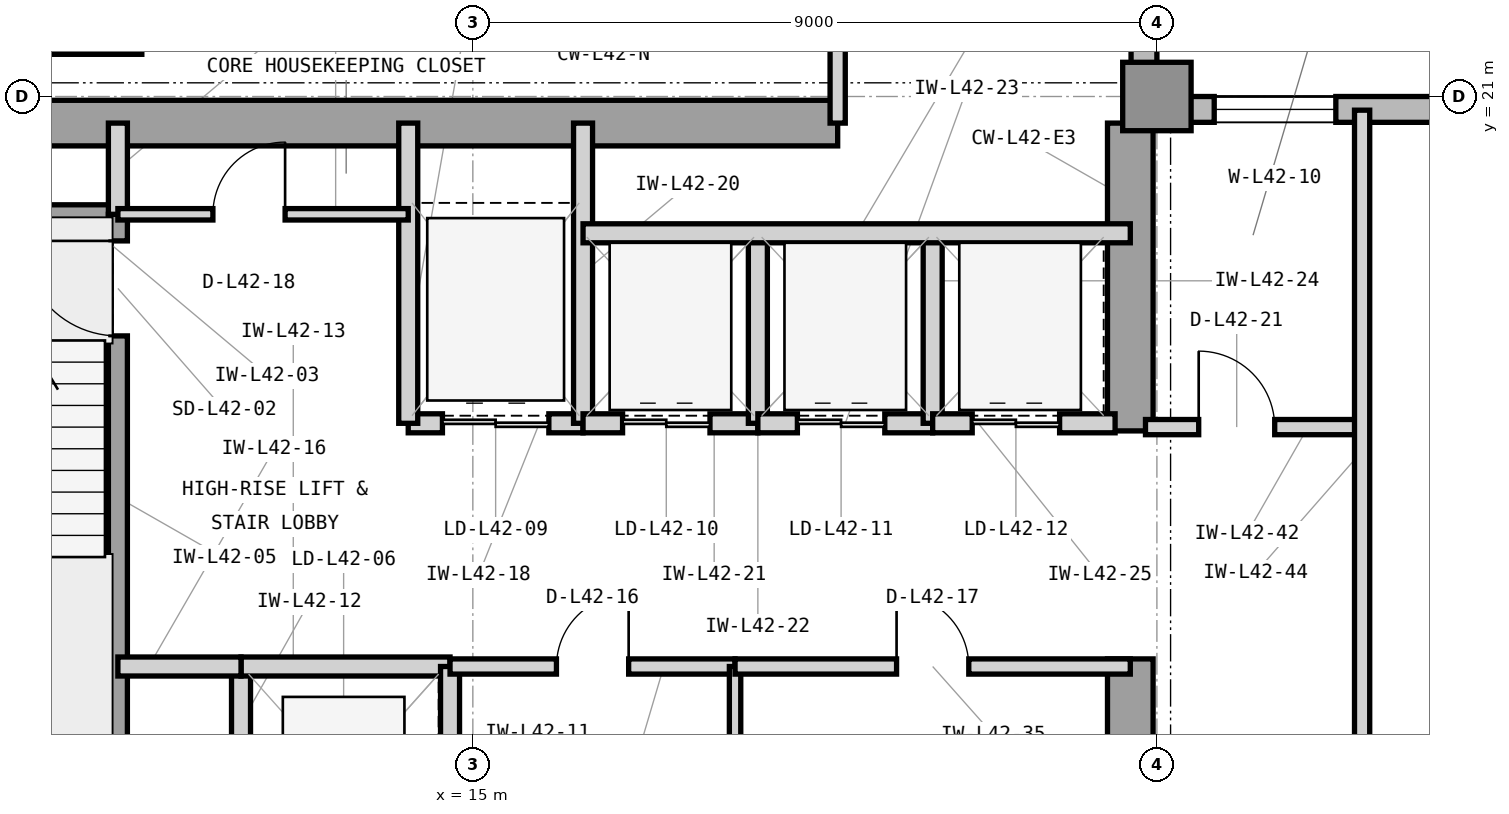
"""IFC4 building model, lengths in metres.
Left out: names, types, materials, properties, quantities, classifications, styles, units other than length and angle.
Written with IfcOpenShell. Run it as: python <this file> out.ifc"""

import sys

from ifc_helpers import new_model, si_unit, direction, frame, frame_2d, origin, origin_2d, place, context, subcontext, project, spatial, rectangle, extrude, element, fill, save


model = new_model("IFC4")
c1 = context("Model", 3, precision=1e-05, world=origin(), true_north=direction((0.0, 1.0)))
c2 = subcontext(c1, "Body", "Model", "MODEL_VIEW")
j1 = project(units=[si_unit("LENGTHUNIT", "METRE"), si_unit("PLANEANGLEUNIT", "RADIAN")], contexts=[c1])
p1 = place(None, origin())
s1 = spatial("IfcSite", under=j1, at=p1, CompositionType="ELEMENT")
p2 = place(p1, origin())
s2 = spatial("IfcBuilding", under=s1, at=p2, CompositionType="ELEMENT")
p3 = place(p2, frame((0.0, 0.0, 176.1)))
s3 = spatial("IfcBuildingStorey", under=s2, at=p3, CompositionType="ELEMENT", Elevation=176.1)
p4 = place(p3, frame((7.475, 20.65, 0.0), z_axis=(0.0, 0.0, 1.0), x_axis=(1.0, 0.0, 0.0)))
e1 = element("IfcWall", 1, at=p4, inside=s3, PredefinedType="SHEAR", context=c2, shape_type="SweptSolid", body=[
    extrude(rectangle(XDim=12.325, YDim=0.6, at=frame_2d((6.163, 0.0))), origin(), (0.0, 0.0, 1.0), 3.9),
])
p5 = place(p3, frame((23.65, 10.4, 0.0), z_axis=(0.0, 0.0, 1.0), x_axis=(0.0, 1.0, 0.0)))
e2 = element("IfcWall", 2, at=p5, inside=s3, PredefinedType="SHEAR", context=c2, shape_type="SweptSolid", body=[
    extrude(rectangle(XDim=3.2, YDim=0.6, at=frame_2d((1.6, 0.0))), origin(), (0.0, 0.0, 1.0), 3.9),
])
p6 = place(p3, frame((23.65, 16.6, 0.0), z_axis=(0.0, 0.0, 1.0), x_axis=(0.0, 1.0, 0.0)))
e3 = element("IfcWall", 3, at=p6, inside=s3, PredefinedType="SHEAR", context=c2, shape_type="SweptSolid", body=[
    extrude(rectangle(XDim=4.05, YDim=0.6, at=frame_2d((2.025, 0.0))), origin(), (0.0, 0.0, 1.0), 3.9),
])
p7 = place(p3, frame((24.0, 21.0, 0.0), z_axis=(0.0, 0.0, 1.0), x_axis=(1.0, 0.0, 0.0)))
e4 = element("IfcColumn", 4, at=p7, inside=s3, PredefinedType="COLUMN", context=c2, shape_type="SweptSolid", body=[
    extrude(rectangle(XDim=0.9, YDim=0.9, at=origin_2d()), origin(), (0.0, 0.0, 1.0), 3.9),
])
p8 = place(p3, frame((55.4, 20.83, 0.0), z_axis=(0.0, 0.0, 1.0), x_axis=(-1.0, 0.0, 0.0)))
e5 = element("IfcWall", 5, at=p8, inside=s3, PredefinedType="STANDARD", context=c2, shape_type="SweptSolid", body=[
    extrude(rectangle(XDim=31.4, YDim=0.34, at=frame_2d((15.7, 0.0))), origin(), (0.0, 0.0, 1.0), 3.7),
])
p9 = place(p8, frame((17.167, 0.0, 0.9)))
e6 = element("IfcOpeningElement", 6, at=p9, cuts=e5, PredefinedType="OPENING", context=c2, shape_type="SweptSolid", body=[
    extrude(rectangle(XDim=2.3, YDim=2.2, at=frame_2d((1.15, 1.1))), frame((0.0, 0.18, 0.0), z_axis=(0.0, -1.0, 0.0), x_axis=(1.0, 0.0, 0.0)), (0.0, 0.0, 1.0), 0.36),
])
p10 = place(p8, frame((29.046, 0.0, 0.9)))
e7 = element("IfcOpeningElement", 7, at=p10, cuts=e5, PredefinedType="OPENING", context=c2, shape_type="SweptSolid", body=[
    extrude(rectangle(XDim=1.6, YDim=2.2, at=frame_2d((0.8, 1.1))), frame((0.0, 0.18, 0.0), z_axis=(0.0, -1.0, 0.0), x_axis=(1.0, 0.0, 0.0)), (0.0, 0.0, 1.0), 0.36),
])
p11 = place(p8, frame((8.675, 0.0, 0.9)))
e8 = element("IfcOpeningElement", 8, at=p11, cuts=e5, PredefinedType="OPENING", context=c2, shape_type="SweptSolid", body=[
    extrude(rectangle(XDim=2.3, YDim=2.2, at=frame_2d((1.15, 1.1))), frame((0.0, 0.18, 0.0), z_axis=(0.0, -1.0, 0.0), x_axis=(1.0, 0.0, 0.0)), (0.0, 0.0, 1.0), 0.36),
])
p12 = place(p3, frame((23.83, 21.0, 0.0), z_axis=(0.0, 0.0, 1.0), x_axis=(0.0, 1.0, 0.0)))
e9 = element("IfcWall", 9, at=p12, inside=s3, PredefinedType="STANDARD", context=c2, shape_type="SweptSolid", body=[
    extrude(rectangle(XDim=22.4, YDim=0.34, at=frame_2d((11.2, 0.0))), origin(), (0.0, 0.0, 1.0), 3.7),
])
p13 = place(p3, frame((7.7, 19.45, 0.0), z_axis=(0.0, 0.0, 1.0), x_axis=(1.0, 0.0, 0.0)))
e10 = element("IfcWall", 10, at=p13, inside=s3, PredefinedType="SHEAR", context=c2, shape_type="SweptSolid", body=[
    extrude(rectangle(XDim=2.755, YDim=0.25, at=frame_2d((1.377, 0.0))), origin(), (0.0, 0.0, 1.0), 3.9),
])
p14 = place(p3, frame((10.33, 12.0, 0.0), z_axis=(0.0, 0.0, 1.0), x_axis=(0.0, 1.0, 0.0)))
e11 = element("IfcWall", 11, at=p14, inside=s3, PredefinedType="SHEAR", context=c2, shape_type="SweptSolid", body=[
    extrude(rectangle(XDim=7.45, YDim=0.25, at=frame_2d((3.725, 0.0))), origin(), (0.0, 0.0, 1.0), 3.9),
])
p15 = place(p14, frame((5.85, 0.0, 0.0)))
e12 = element("IfcOpeningElement", 12, at=p15, cuts=e11, PredefinedType="OPENING", context=c2, shape_type="SweptSolid", body=[
    extrude(rectangle(XDim=1.25, YDim=2.2, at=frame_2d((0.625, 1.1))), frame((0.0, 0.135, 0.0), z_axis=(0.0, -1.0, 0.0), x_axis=(1.0, 0.0, 0.0)), (0.0, 0.0, 1.0), 0.27),
])
p16 = place(p3, frame((10.33, 19.45, 0.0), z_axis=(0.0, 0.0, 1.0), x_axis=(0.0, 1.0, 0.0)))
e13 = element("IfcWall", 13, at=p16, inside=s3, PredefinedType="PARTITIONING", context=c2, shape_type="SweptSolid", body=[
    extrude(rectangle(XDim=1.2, YDim=0.25, at=frame_2d((0.6, 0.0))), origin(), (0.0, 0.0, 1.0), 3.073),
])
p17 = place(p3, frame((11.95, 10.5, 0.0), z_axis=(0.0, 0.0, 1.0), x_axis=(0.0, 1.0, 0.0)))
e14 = element("IfcWall", 14, at=p17, inside=s3, PredefinedType="PARTITIONING", context=c2, shape_type="SweptSolid", body=[
    extrude(rectangle(XDim=3.0, YDim=0.25, at=frame_2d((1.5, 0.0))), origin(), (0.0, 0.0, 1.0), 3.69),
])
p18 = place(p3, frame((11.95, 13.5, 0.0), z_axis=(0.0, 0.0, 1.0), x_axis=(1.0, 0.0, 0.0)))
e15 = element("IfcWall", 15, at=p18, inside=s3, PredefinedType="PARTITIONING", context=c2, shape_type="SweptSolid", body=[
    extrude(rectangle(XDim=2.75, YDim=0.25, at=frame_2d((1.375, 0.0))), origin(), (0.0, 0.0, 1.0), 3.283),
])
p19 = place(p3, frame((14.7, 10.5, 0.0), z_axis=(0.0, 0.0, 1.0), x_axis=(0.0, 1.0, 0.0)))
e16 = element("IfcWall", 16, at=p19, inside=s3, PredefinedType="PARTITIONING", context=c2, shape_type="SweptSolid", body=[
    extrude(rectangle(XDim=3.0, YDim=0.25, at=frame_2d((1.5, 0.0))), origin(), (0.0, 0.0, 1.0), 3.69),
])
p20 = place(p3, frame((10.33, 13.5, 0.0), z_axis=(0.0, 0.0, 1.0), x_axis=(1.0, 0.0, 0.0)))
e17 = element("IfcWall", 17, at=p20, inside=s3, PredefinedType="PARTITIONING", context=c2, shape_type="SweptSolid", body=[
    extrude(rectangle(XDim=1.62, YDim=0.25, at=frame_2d((0.81, 0.0))), origin(), (0.0, 0.0, 1.0), 3.283),
])
p21 = place(p3, frame((14.15, 16.7, 0.0), z_axis=(0.0, 0.0, 1.0), x_axis=(1.0, 0.0, 0.0)))
e18 = element("IfcWall", 18, at=p21, inside=s3, PredefinedType="PARTITIONING", context=c2, shape_type="SweptSolid", body=[
    extrude(rectangle(XDim=2.3, YDim=0.25, at=frame_2d((1.15, 0.0))), origin(), (0.0, 0.0, 1.0), 3.283),
])
p22 = place(p21, frame((0.45, 0.0, 0.0)))
e19 = element("IfcOpeningElement", 19, at=p22, cuts=e18, PredefinedType="OPENING", context=c2, shape_type="SweptSolid", body=[
    extrude(rectangle(XDim=1.4, YDim=2.35, at=frame_2d((0.7, 1.175))), frame((0.0, 0.135, 0.0), z_axis=(0.0, -1.0, 0.0), x_axis=(1.0, 0.0, 0.0)), (0.0, 0.0, 1.0), 0.27),
])
for number, where, z_axis, x_axis in (
    (20, (14.15, 16.7, 0.0), (0.0, 0.0, 1.0), (0.0, 1.0, 0.0)),
    (21, (16.45, 16.7, 0.0), (0.0, 0.0, 1.0), (0.0, 1.0, 0.0)),
):
    element("IfcWall", number, at=place(p3, frame(where, z_axis=z_axis, x_axis=x_axis)), inside=s3, PredefinedType="PARTITIONING", context=c2, shape_type="SweptSolid", body=[
        extrude(rectangle(XDim=3.95, YDim=0.25, at=frame_2d((1.975, 0.0))), origin(), (0.0, 0.0, 1.0), 3.69),
    ])
p23 = place(p3, frame((16.45, 16.7, 0.0), z_axis=(0.0, 0.0, 1.0), x_axis=(1.0, 0.0, 0.0)))
e22 = element("IfcWall", 22, at=p23, inside=s3, PredefinedType="PARTITIONING", context=c2, shape_type="SweptSolid", body=[
    extrude(rectangle(XDim=2.3, YDim=0.25, at=frame_2d((1.15, 0.0))), origin(), (0.0, 0.0, 1.0), 3.283),
])
p24 = place(p23, frame((0.52, 0.0, 0.0)))
e23 = element("IfcOpeningElement", 23, at=p24, cuts=e22, PredefinedType="OPENING", context=c2, shape_type="SweptSolid", body=[
    extrude(rectangle(XDim=1.15, YDim=2.25, at=frame_2d((0.575, 1.125))), frame((0.0, 0.135, 0.0), z_axis=(0.0, -1.0, 0.0), x_axis=(1.0, 0.0, 0.0)), (0.0, 0.0, 1.0), 0.27),
])
p25 = place(p3, frame((18.75, 16.7, 0.0), z_axis=(0.0, 0.0, 1.0), x_axis=(0.0, 1.0, 0.0)))
e24 = element("IfcWall", 24, at=p25, inside=s3, PredefinedType="PARTITIONING", context=c2, shape_type="SweptSolid", body=[
    extrude(rectangle(XDim=2.5, YDim=0.25, at=frame_2d((1.25, 0.0))), origin(), (0.0, 0.0, 1.0), 3.69),
])
p26 = place(p3, frame((18.75, 16.7, 0.0), z_axis=(0.0, 0.0, 1.0), x_axis=(1.0, 0.0, 0.0)))
e25 = element("IfcWall", 25, at=p26, inside=s3, PredefinedType="PARTITIONING", context=c2, shape_type="SweptSolid", body=[
    extrude(rectangle(XDim=2.3, YDim=0.25, at=frame_2d((1.15, 0.0))), origin(), (0.0, 0.0, 1.0), 3.283),
])
p27 = place(p26, frame((0.52, 0.0, 0.0)))
e26 = element("IfcOpeningElement", 26, at=p27, cuts=e25, PredefinedType="OPENING", context=c2, shape_type="SweptSolid", body=[
    extrude(rectangle(XDim=1.15, YDim=2.25, at=frame_2d((0.575, 1.125))), frame((0.0, 0.135, 0.0), z_axis=(0.0, -1.0, 0.0), x_axis=(1.0, 0.0, 0.0)), (0.0, 0.0, 1.0), 0.27),
])
p28 = place(p3, frame((21.05, 16.7, 0.0), z_axis=(0.0, 0.0, 1.0), x_axis=(0.0, 1.0, 0.0)))
e27 = element("IfcWall", 27, at=p28, inside=s3, PredefinedType="PARTITIONING", context=c2, shape_type="SweptSolid", body=[
    extrude(rectangle(XDim=2.5, YDim=0.25, at=frame_2d((1.25, 0.0))), origin(), (0.0, 0.0, 1.0), 3.69),
])
p29 = place(p3, frame((21.05, 16.7, 0.0), z_axis=(0.0, 0.0, 1.0), x_axis=(1.0, 0.0, 0.0)))
e28 = element("IfcWall", 28, at=p29, inside=s3, PredefinedType="PARTITIONING", context=c2, shape_type="SweptSolid", body=[
    extrude(rectangle(XDim=2.4, YDim=0.25, at=frame_2d((1.2, 0.0))), origin(), (0.0, 0.0, 1.0), 3.283),
])
p30 = place(p29, frame((0.52, 0.0, 0.0)))
e29 = element("IfcOpeningElement", 29, at=p30, cuts=e28, PredefinedType="OPENING", context=c2, shape_type="SweptSolid", body=[
    extrude(rectangle(XDim=1.15, YDim=2.25, at=frame_2d((0.575, 1.125))), frame((0.0, 0.135, 0.0), z_axis=(0.0, -1.0, 0.0), x_axis=(1.0, 0.0, 0.0)), (0.0, 0.0, 1.0), 0.27),
])
p31 = place(p3, frame((16.45, 19.2, 0.0), z_axis=(0.0, 0.0, 1.0), x_axis=(1.0, 0.0, 0.0)))
e30 = element("IfcWall", 30, at=p31, inside=s3, PredefinedType="PARTITIONING", context=c2, shape_type="SweptSolid", body=[
    extrude(rectangle(XDim=7.2, YDim=0.25, at=frame_2d((3.6, 0.0))), origin(), (0.0, 0.0, 1.0), 3.69),
])
p32 = place(p3, frame((14.7, 13.5, 0.0), z_axis=(0.0, 0.0, 1.0), x_axis=(1.0, 0.0, 0.0)))
e31 = element("IfcWall", 31, at=p32, inside=s3, PredefinedType="PARTITIONING", context=c2, shape_type="SweptSolid", body=[
    extrude(rectangle(XDim=3.75, YDim=0.2, at=frame_2d((1.875, 0.0))), origin(), (0.0, 0.0, 1.0), 3.283),
])
p33 = place(p32, frame((1.4, 0.0, 0.0)))
e32 = element("IfcOpeningElement", 32, at=p33, cuts=e31, PredefinedType="OPENING", context=c2, shape_type="SweptSolid", body=[
    extrude(rectangle(XDim=0.95, YDim=2.1, at=frame_2d((0.475, 1.05))), frame((0.0, 0.11, 0.0), z_axis=(0.0, -1.0, 0.0), x_axis=(1.0, 0.0, 0.0)), (0.0, 0.0, 1.0), 0.22),
])
p34 = place(p3, frame((18.45, 10.28, 0.0), z_axis=(0.0, 0.0, 1.0), x_axis=(0.0, 1.0, 0.0)))
e33 = element("IfcWall", 33, at=p34, inside=s3, PredefinedType="PARTITIONING", context=c2, shape_type="SweptSolid", body=[
    extrude(rectangle(XDim=3.22, YDim=0.15, at=frame_2d((1.61, 0.0))), origin(), (0.0, 0.0, 1.0), 3.69),
])
p35 = place(p3, frame((18.45, 13.5, 0.0), z_axis=(0.0, 0.0, 1.0), x_axis=(1.0, 0.0, 0.0)))
e34 = element("IfcWall", 34, at=p35, inside=s3, PredefinedType="PARTITIONING", context=c2, shape_type="SweptSolid", body=[
    extrude(rectangle(XDim=5.2, YDim=0.2, at=frame_2d((2.6, 0.0))), origin(), (0.0, 0.0, 1.0), 3.283),
])
p36 = place(p35, frame((2.125, 0.0, 0.0)))
e35 = element("IfcOpeningElement", 35, at=p36, cuts=e34, PredefinedType="OPENING", context=c2, shape_type="SweptSolid", body=[
    extrude(rectangle(XDim=0.95, YDim=2.1, at=frame_2d((0.475, 1.05))), frame((0.0, 0.11, 0.0), z_axis=(0.0, -1.0, 0.0), x_axis=(1.0, 0.0, 0.0)), (0.0, 0.0, 1.0), 0.22),
])
p37 = place(p3, frame((10.33, 19.45, 0.0), z_axis=(0.0, 0.0, 1.0), x_axis=(1.0, 0.0, 0.0)))
e36 = element("IfcWall", 36, at=p37, inside=s3, PredefinedType="PARTITIONING", context=c2, shape_type="SweptSolid", body=[
    extrude(rectangle(XDim=3.82, YDim=0.15, at=frame_2d((1.91, 0.0))), origin(), (0.0, 0.0, 1.0), 3.69),
])
p38 = place(p37, frame((1.25, 0.0, 0.0)))
e37 = element("IfcOpeningElement", 37, at=p38, cuts=e36, PredefinedType="OPENING", context=c2, shape_type="SweptSolid", body=[
    extrude(rectangle(XDim=0.95, YDim=2.1, at=frame_2d((0.475, 1.05))), frame((0.0, 0.085, 0.0), z_axis=(0.0, -1.0, 0.0), x_axis=(1.0, 0.0, 0.0)), (0.0, 0.0, 1.0), 0.17),
])
p39 = place(p3, frame((6.555, 21.68, 0.0), z_axis=(0.0, 0.0, 1.0), x_axis=(1.0, 0.0, 0.0)))
e38 = element("IfcWall", 38, at=p39, inside=s3, PredefinedType="SHEAR", context=c2, shape_type="SweptSolid", body=[
    extrude(rectangle(XDim=4.09, YDim=0.25, at=frame_2d((2.045, 0.0))), origin(), (0.0, 0.0, 1.0), 3.9),
])
p40 = place(p3, frame((23.85, 16.65, 0.0), z_axis=(0.0, 0.0, 1.0), x_axis=(1.0, 0.0, 0.0)))
e39 = element("IfcWall", 39, at=p40, inside=s3, PredefinedType="PARTITIONING", context=c2, shape_type="SweptSolid", body=[
    extrude(rectangle(XDim=2.85, YDim=0.2, at=frame_2d((1.425, 0.0))), origin(), (0.0, 0.0, 1.0), 3.69),
])
p41 = place(p40, frame((0.7, 0.0, 0.0)))
e40 = element("IfcOpeningElement", 40, at=p41, cuts=e39, PredefinedType="OPENING", context=c2, shape_type="SweptSolid", body=[
    extrude(rectangle(XDim=1.0, YDim=2.15, at=frame_2d((0.5, 1.075))), frame((0.0, 0.11, 0.0), z_axis=(0.0, -1.0, 0.0), x_axis=(1.0, 0.0, 0.0)), (0.0, 0.0, 1.0), 0.22),
])
p42 = place(p3, frame((26.7, 11.85, 0.0), z_axis=(0.0, 0.0, 1.0), x_axis=(0.0, 1.0, 0.0)))
e41 = element("IfcWall", 41, at=p42, inside=s3, PredefinedType="PARTITIONING", context=c2, shape_type="SweptSolid", body=[
    extrude(rectangle(XDim=8.97, YDim=0.2, at=frame_2d((4.485, 0.0))), origin(), (0.0, 0.0, 1.0), 3.69),
])
p43 = place(p3, frame((19.8, 20.65, 0.0), z_axis=(0.0, 0.0, 1.0), x_axis=(0.0, 1.0, 0.0)))
e42 = element("IfcWall", 42, at=p43, inside=s3, PredefinedType="PARTITIONING", context=c2, shape_type="SweptSolid", body=[
    extrude(rectangle(XDim=6.15, YDim=0.2, at=frame_2d((3.075, 0.0))), origin(), (0.0, 0.0, 1.0), 3.69),
])
p44 = place(p15, origin())
e43 = element("IfcDoor", 43, at=p44, inside=s3, OperationType="SINGLE_SWING_RIGHT", PredefinedType="DOOR", context=c2, shape_type="SweptSolid", body=[
    extrude(rectangle(XDim=1.25, YDim=2.2, at=frame_2d((0.625, 1.1))), frame((0.0, 0.025, 0.0), z_axis=(0.0, -1.0, 0.0), x_axis=(1.0, 0.0, 0.0)), (0.0, 0.0, 1.0), 0.05),
])
fill(e12, e43)
p45 = place(p22, origin())
e44 = element("IfcDoor", 44, at=p45, inside=s3, OperationType="DOUBLE_DOOR_SLIDING", PredefinedType="DOOR", context=c2, shape_type="SweptSolid", body=[
    extrude(rectangle(XDim=1.4, YDim=2.35, at=frame_2d((0.7, 1.175))), frame((0.0, 0.025, 0.0), z_axis=(0.0, -1.0, 0.0), x_axis=(1.0, 0.0, 0.0)), (0.0, 0.0, 1.0), 0.05),
])
fill(e19, e44)
p46 = place(p24, origin())
e45 = element("IfcDoor", 45, at=p46, inside=s3, OperationType="DOUBLE_DOOR_SLIDING", PredefinedType="DOOR", context=c2, shape_type="SweptSolid", body=[
    extrude(rectangle(XDim=1.15, YDim=2.25, at=frame_2d((0.575, 1.125))), frame((0.0, 0.025, 0.0), z_axis=(0.0, -1.0, 0.0), x_axis=(1.0, 0.0, 0.0)), (0.0, 0.0, 1.0), 0.05),
])
fill(e23, e45)
p47 = place(p27, origin())
e46 = element("IfcDoor", 46, at=p47, inside=s3, OperationType="DOUBLE_DOOR_SLIDING", PredefinedType="DOOR", context=c2, shape_type="SweptSolid", body=[
    extrude(rectangle(XDim=1.15, YDim=2.25, at=frame_2d((0.575, 1.125))), frame((0.0, 0.025, 0.0), z_axis=(0.0, -1.0, 0.0), x_axis=(1.0, 0.0, 0.0)), (0.0, 0.0, 1.0), 0.05),
])
fill(e26, e46)
p48 = place(p30, origin())
e47 = element("IfcDoor", 47, at=p48, inside=s3, OperationType="DOUBLE_DOOR_SLIDING", PredefinedType="DOOR", context=c2, shape_type="SweptSolid", body=[
    extrude(rectangle(XDim=1.15, YDim=2.25, at=frame_2d((0.575, 1.125))), frame((0.0, 0.025, 0.0), z_axis=(0.0, -1.0, 0.0), x_axis=(1.0, 0.0, 0.0)), (0.0, 0.0, 1.0), 0.05),
])
fill(e29, e47)
p49 = place(p33, origin())
e48 = element("IfcDoor", 48, at=p49, inside=s3, OperationType="SINGLE_SWING_RIGHT", PredefinedType="DOOR", context=c2, shape_type="SweptSolid", body=[
    extrude(rectangle(XDim=0.95, YDim=2.1, at=frame_2d((0.475, 1.05))), frame((0.0, 0.025, 0.0), z_axis=(0.0, -1.0, 0.0), x_axis=(1.0, 0.0, 0.0)), (0.0, 0.0, 1.0), 0.05),
])
fill(e32, e48)
p50 = place(p36, origin())
e49 = element("IfcDoor", 49, at=p50, inside=s3, OperationType="SINGLE_SWING_LEFT", PredefinedType="DOOR", context=c2, shape_type="SweptSolid", body=[
    extrude(rectangle(XDim=0.95, YDim=2.1, at=frame_2d((0.475, 1.05))), frame((0.0, 0.025, 0.0), z_axis=(0.0, -1.0, 0.0), x_axis=(1.0, 0.0, 0.0)), (0.0, 0.0, 1.0), 0.05),
])
fill(e35, e49)
p51 = place(p38, origin())
e50 = element("IfcDoor", 50, at=p51, inside=s3, OperationType="SINGLE_SWING_RIGHT", PredefinedType="DOOR", context=c2, shape_type="SweptSolid", body=[
    extrude(rectangle(XDim=0.95, YDim=2.1, at=frame_2d((0.475, 1.05))), frame((0.0, 0.025, 0.0), z_axis=(0.0, -1.0, 0.0), x_axis=(1.0, 0.0, 0.0)), (0.0, 0.0, 1.0), 0.05),
])
fill(e37, e50)
p52 = place(p41, origin())
e51 = element("IfcDoor", 51, at=p52, inside=s3, OperationType="SINGLE_SWING_LEFT", PredefinedType="DOOR", context=c2, shape_type="SweptSolid", body=[
    extrude(rectangle(XDim=1.0, YDim=2.15, at=frame_2d((0.5, 1.075))), frame((0.0, 0.025, 0.0), z_axis=(0.0, -1.0, 0.0), x_axis=(1.0, 0.0, 0.0)), (0.0, 0.0, 1.0), 0.05),
])
fill(e40, e51)
p53 = place(p10, origin())
e52 = element("IfcWindow", 52, at=p53, inside=s3, PartitioningType="SINGLE_PANEL", PredefinedType="WINDOW", context=c2, shape_type="SweptSolid", body=[
    extrude(rectangle(XDim=1.6, YDim=2.2, at=frame_2d((0.8, 1.1))), frame((0.0, 0.11, 0.0), z_axis=(0.0, -1.0, 0.0), x_axis=(1.0, 0.0, 0.0)), (0.0, 0.0, 1.0), 0.06),
])
fill(e7, e52)
save(model, sys.argv[1])
